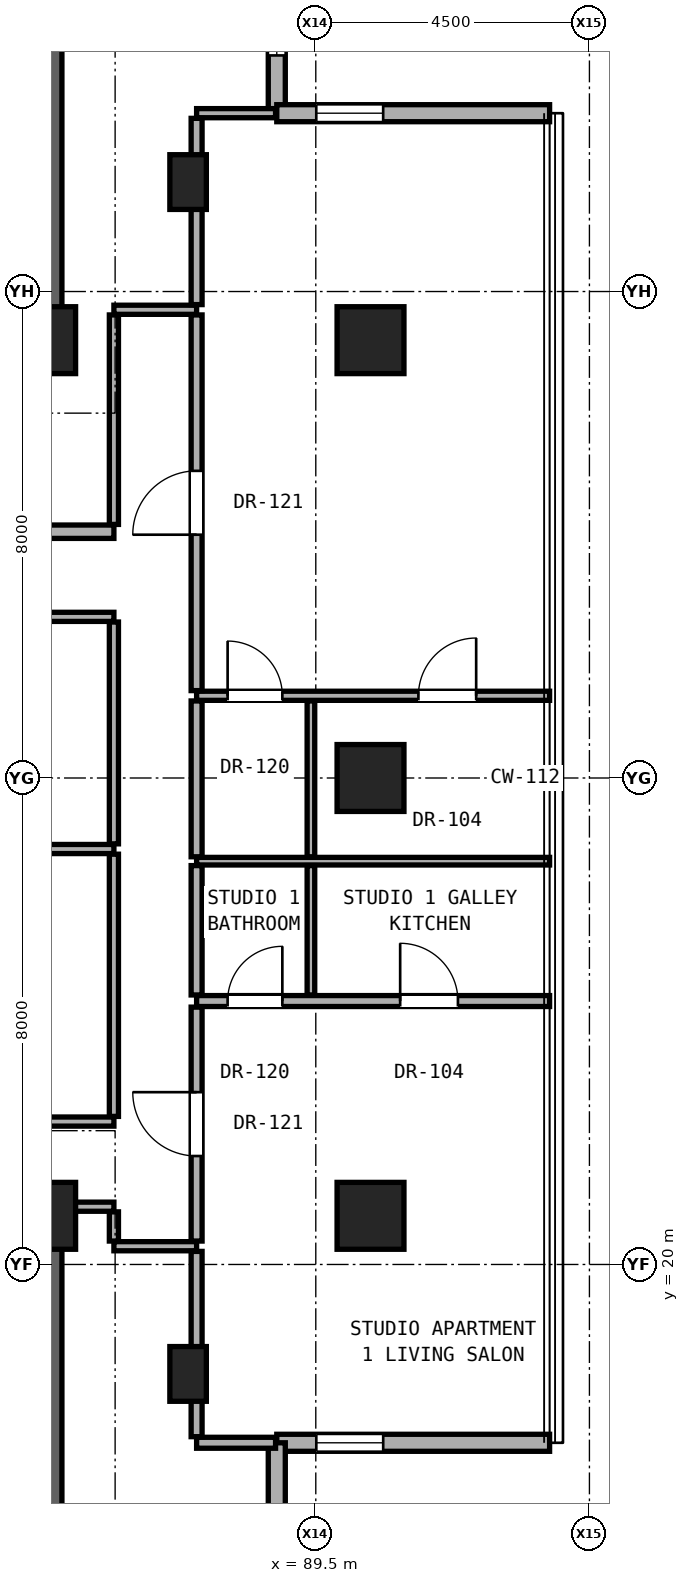
"""IFC4 building model, lengths in metres.
Left out: names, types, materials, properties, quantities, classifications, styles, units other than length and angle.
Written with IfcOpenShell. Run it as: python <this file> out.ifc"""

import sys

from ifc_helpers import new_model, si_unit, direction, frame, frame_2d, origin, origin_2d, place, context, subcontext, project, spatial, rectangle, hollow_rectangle, extrude, element, fill, save


model = new_model("IFC4")
c1 = context("Model", 3, precision=1e-05, world=origin(), true_north=direction((0.0, 1.0)))
c2 = subcontext(c1, "Body", "Model", "MODEL_VIEW")
j1 = project(units=[si_unit("LENGTHUNIT", "METRE"), si_unit("PLANEANGLEUNIT", "RADIAN")], contexts=[c1])
p1 = place(None, origin())
s1 = spatial("IfcSite", under=j1, at=p1, CompositionType="ELEMENT")
p2 = place(p1, origin())
s2 = spatial("IfcBuilding", under=s1, at=p2, CompositionType="ELEMENT")
p3 = place(p2, frame((0.0, 0.0, 118.1)))
s3 = spatial("IfcBuildingStorey", under=s2, at=p3, CompositionType="ELEMENT", Elevation=118.1)
for number, where, z_axis, x_axis in (
    (1, (85.0, 20.8, 0.0), (0.0, 0.0, 1.0), (1.0, 0.0, 0.0)),
    (2, (85.0, 35.2, 0.0), (0.0, 0.0, 1.0), (1.0, 0.0, 0.0)),
):
    element("IfcColumn", number, at=place(p3, frame(where, z_axis=z_axis, x_axis=x_axis)), inside=s3, PredefinedType="COLUMN", context=c2, shape_type="SweptSolid", body=[
        extrude(rectangle(XDim=1.1, YDim=1.1, at=origin_2d()), origin(), (0.0, 0.0, 1.0), 3.3),
    ])
for number, where, z_axis, x_axis in (
    (3, (90.4, 20.8, 0.0), (0.0, 0.0, 1.0), (1.0, 0.0, 0.0)),
    (4, (90.4, 28.0, 0.0), (0.0, 0.0, 1.0), (1.0, 0.0, 0.0)),
    (5, (90.4, 35.2, 0.0), (0.0, 0.0, 1.0), (1.0, 0.0, 0.0)),
):
    element("IfcColumn", number, at=place(p3, frame(where, z_axis=z_axis, x_axis=x_axis)), inside=s3, PredefinedType="COLUMN", context=c2, shape_type="SweptSolid", body=[
        extrude(hollow_rectangle(XDim=1.1, YDim=1.1, WallThickness=0.06, at=origin_2d()), origin(), (0.0, 0.0, 1.0), 3.3),
    ])
for number, where, z_axis, x_axis in (
    (6, (87.4, 18.2, 0.0), (0.0, 0.0, 1.0), (1.0, 0.0, 0.0)),
    (7, (87.4, 37.8, 0.0), (0.0, 0.0, 1.0), (1.0, 0.0, 0.0)),
):
    element("IfcColumn", number, at=place(p3, frame(where, z_axis=z_axis, x_axis=x_axis)), inside=s3, PredefinedType="PILASTER", context=c2, shape_type="SweptSolid", body=[
        extrude(rectangle(XDim=0.6, YDim=0.9, at=origin_2d()), origin(), (0.0, 0.0, 1.0), 3.3),
    ])
for number, where, z_axis, x_axis in (
    (8, (85.0, 35.2, 0.0), (0.0, 0.0, 1.0), (0.0, 1.0, 0.0)),
    (9, (85.0, 15.2, 0.0), (0.0, 0.0, 1.0), (0.0, 1.0, 0.0)),
):
    element("IfcWall", number, at=place(p3, frame(where, z_axis=z_axis, x_axis=x_axis)), inside=s3, PredefinedType="SHEAR", context=c2, shape_type="SweptSolid", body=[
        extrude(rectangle(XDim=5.6, YDim=0.65, at=frame_2d((2.8, 0.0))), origin(), (0.0, 0.0, 1.0), 3.08),
    ])
p4 = place(p3, frame((88.858, 38.933, 0.0), z_axis=(0.0, 0.0, 1.0), x_axis=(0.0, 1.0, 0.0)))
e10 = element("IfcWall", 10, at=p4, inside=s3, PredefinedType="SOLIDWALL", context=c2, shape_type="SweptSolid", body=[
    extrude(rectangle(XDim=4.486, YDim=0.28, at=frame_2d((2.243, 0.0))), origin(), (0.0, 0.0, 1.0), 3.06),
])
p5 = place(p4, frame((0.95, 0.0, 0.85)))
e11 = element("IfcOpeningElement", 11, at=p5, cuts=e10, PredefinedType="OPENING", context=c2, shape_type="SweptSolid", body=[
    extrude(rectangle(XDim=1.1, YDim=2.0, at=frame_2d((0.55, 1.0))), frame((0.0, 0.15, 0.0), z_axis=(0.0, -1.0, 0.0), x_axis=(1.0, 0.0, 0.0)), (0.0, 0.0, 1.0), 0.3),
])
p6 = place(p3, frame((88.858, 17.067, 0.0), z_axis=(0.0, 0.0, 1.0), x_axis=(1.0, 0.0, 0.0)))
e12 = element("IfcWall", 12, at=p6, inside=s3, PredefinedType="SOLIDWALL", context=c2, shape_type="SweptSolid", body=[
    extrude(rectangle(XDim=4.487, YDim=0.28, at=frame_2d((2.243, 0.0))), origin(), (0.0, 0.0, 1.0), 3.06),
])
p7 = place(p6, frame((0.65, 0.0, 0.85)))
e13 = element("IfcOpeningElement", 13, at=p7, cuts=e12, PredefinedType="OPENING", context=c2, shape_type="SweptSolid", body=[
    extrude(rectangle(XDim=1.1, YDim=2.0, at=frame_2d((0.55, 1.0))), frame((0.0, 0.15, 0.0), z_axis=(0.0, -1.0, 0.0), x_axis=(1.0, 0.0, 0.0)), (0.0, 0.0, 1.0), 0.3),
])
p8 = place(p3, frame((88.858, 12.581, 0.0), z_axis=(0.0, 0.0, 1.0), x_axis=(0.0, 1.0, 0.0)))
e14 = element("IfcWall", 14, at=p8, inside=s3, PredefinedType="SOLIDWALL", context=c2, shape_type="SweptSolid", body=[
    extrude(rectangle(XDim=4.486, YDim=0.28, at=frame_2d((2.243, 0.0))), origin(), (0.0, 0.0, 1.0), 3.06),
])
p9 = place(p3, frame((93.345, 38.933, 0.0), z_axis=(0.0, 0.0, 1.0), x_axis=(-1.0, 0.0, 0.0)))
e15 = element("IfcWall", 15, at=p9, inside=s3, PredefinedType="SOLIDWALL", context=c2, shape_type="SweptSolid", body=[
    extrude(rectangle(XDim=4.487, YDim=0.28, at=frame_2d((2.243, 0.0))), origin(), (0.0, 0.0, 1.0), 3.06),
])
p10 = place(p9, frame((2.737, 0.0, 0.85)))
e16 = element("IfcOpeningElement", 16, at=p10, cuts=e15, PredefinedType="OPENING", context=c2, shape_type="SweptSolid", body=[
    extrude(rectangle(XDim=1.1, YDim=2.0, at=frame_2d((0.55, 1.0))), frame((0.0, 0.15, 0.0), z_axis=(0.0, -1.0, 0.0), x_axis=(1.0, 0.0, 0.0)), (0.0, 0.0, 1.0), 0.3),
])
p11 = place(p3, frame((87.54, 17.068, 0.0), z_axis=(0.0, 0.0, 1.0), x_axis=(1.0, 0.0, 0.0)))
e17 = element("IfcWall", 17, at=p11, inside=s3, PredefinedType="PARTITIONING", context=c2, shape_type="SweptSolid", body=[
    extrude(rectangle(XDim=1.298, YDim=0.18, at=frame_2d((0.649, 0.0))), origin(), (0.0, 0.0, 1.0), 3.08),
])
p12 = place(p3, frame((86.18, 20.3, 0.0), z_axis=(0.0, 0.0, 1.0), x_axis=(1.0, 0.0, 0.0)))
e18 = element("IfcWall", 18, at=p12, inside=s3, PredefinedType="PARTITIONING", context=c2, shape_type="SweptSolid", body=[
    extrude(rectangle(XDim=1.36, YDim=0.15, at=frame_2d((0.68, 0.0))), origin(), (0.0, 0.0, 1.0), 3.08),
])
p13 = place(p3, frame((85.32, 20.95, 0.0), z_axis=(0.0, 0.0, 1.0), x_axis=(1.0, 0.0, 0.0)))
e19 = element("IfcWall", 19, at=p13, inside=s3, PredefinedType="PARTITIONING", context=c2, shape_type="SweptSolid", body=[
    extrude(rectangle(XDim=0.86, YDim=0.15, at=frame_2d((0.43, 0.0))), origin(), (0.0, 0.0, 1.0), 2.472),
])
p14 = place(p3, frame((66.68, 22.35, 0.0), z_axis=(0.0, 0.0, 1.0), x_axis=(1.0, 0.0, 0.0)))
e20 = element("IfcWall", 20, at=p14, inside=s3, PredefinedType="PARTITIONING", context=c2, shape_type="SweptSolid", body=[
    extrude(rectangle(XDim=19.5, YDim=0.15, at=frame_2d((9.75, 0.0))), origin(), (0.0, 0.0, 1.0), 2.216),
])
p15 = place(p14, frame((11.89, 0.0, 0.0)))
e21 = element("IfcOpeningElement", 21, at=p15, cuts=e20, PredefinedType="OPENING", context=c2, shape_type="SweptSolid", body=[
    extrude(rectangle(XDim=1.05, YDim=2.2, at=frame_2d((0.525, 1.1))), frame((0.0, 0.085, 0.0), z_axis=(0.0, -1.0, 0.0), x_axis=(1.0, 0.0, 0.0)), (0.0, 0.0, 1.0), 0.17),
])
p16 = place(p3, frame((87.54, 24.332, 0.0), z_axis=(0.0, 0.0, 1.0), x_axis=(1.0, 0.0, 0.0)))
e22 = element("IfcWall", 22, at=p16, inside=s3, PredefinedType="PARTITIONING", context=c2, shape_type="SweptSolid", body=[
    extrude(rectangle(XDim=5.805, YDim=0.18, at=frame_2d((2.902, 0.0))), origin(), (0.0, 0.0, 1.0), 2.299),
])
p17 = place(p16, frame((3.347, 0.0, 0.0)))
e23 = element("IfcOpeningElement", 23, at=p17, cuts=e22, PredefinedType="OPENING", context=c2, shape_type="SweptSolid", body=[
    extrude(rectangle(XDim=0.95, YDim=2.15, at=frame_2d((0.475, 1.075))), frame((0.0, 0.1, 0.0), z_axis=(0.0, -1.0, 0.0), x_axis=(1.0, 0.0, 0.0)), (0.0, 0.0, 1.0), 0.2),
])
p18 = place(p16, frame((0.51, 0.0, 0.0)))
e24 = element("IfcOpeningElement", 24, at=p18, cuts=e22, PredefinedType="OPENING", context=c2, shape_type="SweptSolid", body=[
    extrude(rectangle(XDim=0.9, YDim=2.1, at=frame_2d((0.45, 1.05))), frame((0.0, 0.1, 0.0), z_axis=(0.0, -1.0, 0.0), x_axis=(1.0, 0.0, 0.0)), (0.0, 0.0, 1.0), 0.2),
])
p19 = place(p3, frame((87.54, 26.632, 0.0), z_axis=(0.0, 0.0, 1.0), x_axis=(1.0, 0.0, 0.0)))
e25 = element("IfcWall", 25, at=p19, inside=s3, PredefinedType="PARTITIONING", context=c2, shape_type="SweptSolid", body=[
    extrude(rectangle(XDim=5.805, YDim=0.125, at=frame_2d((2.902, 0.0))), origin(), (0.0, 0.0, 1.0), 2.299),
])
p20 = place(p3, frame((72.05, 26.832, 0.0), z_axis=(0.0, 0.0, 1.0), x_axis=(1.0, 0.0, 0.0)))
e26 = element("IfcWall", 26, at=p20, inside=s3, PredefinedType="PARTITIONING", context=c2, shape_type="SweptSolid", body=[
    extrude(rectangle(XDim=14.13, YDim=0.15, at=frame_2d((7.065, 0.0))), origin(), (0.0, 0.0, 1.0), 2.216),
])
p21 = place(p3, frame((87.54, 29.352, 0.0), z_axis=(0.0, 0.0, 1.0), x_axis=(1.0, 0.0, 0.0)))
e27 = element("IfcWall", 27, at=p21, inside=s3, PredefinedType="PARTITIONING", context=c2, shape_type="SweptSolid", body=[
    extrude(rectangle(XDim=5.805, YDim=0.15, at=frame_2d((2.902, 0.0))), origin(), (0.0, 0.0, 1.0), 2.299),
])
p22 = place(p21, frame((3.647, 0.0, 0.0)))
e28 = element("IfcOpeningElement", 28, at=p22, cuts=e27, PredefinedType="OPENING", context=c2, shape_type="SweptSolid", body=[
    extrude(rectangle(XDim=0.95, YDim=2.15, at=frame_2d((0.475, 1.075))), frame((0.0, 0.085, 0.0), z_axis=(0.0, -1.0, 0.0), x_axis=(1.0, 0.0, 0.0)), (0.0, 0.0, 1.0), 0.17),
])
p23 = place(p21, frame((0.51, 0.0, 0.0)))
e29 = element("IfcOpeningElement", 29, at=p23, cuts=e27, PredefinedType="OPENING", context=c2, shape_type="SweptSolid", body=[
    extrude(rectangle(XDim=0.9, YDim=2.1, at=frame_2d((0.45, 1.05))), frame((0.0, 0.085, 0.0), z_axis=(0.0, -1.0, 0.0), x_axis=(1.0, 0.0, 0.0)), (0.0, 0.0, 1.0), 0.17),
])
p24 = place(p3, frame((66.68, 30.65, 0.0), z_axis=(0.0, 0.0, 1.0), x_axis=(1.0, 0.0, 0.0)))
e30 = element("IfcWall", 30, at=p24, inside=s3, PredefinedType="PARTITIONING", context=c2, shape_type="SweptSolid", body=[
    extrude(rectangle(XDim=19.5, YDim=0.15, at=frame_2d((9.75, 0.0))), origin(), (0.0, 0.0, 1.0), 2.216),
])
p25 = place(p24, frame((3.745, 0.0, 0.0)))
e31 = element("IfcOpeningElement", 31, at=p25, cuts=e30, PredefinedType="OPENING", context=c2, shape_type="SweptSolid", body=[
    extrude(rectangle(XDim=0.95, YDim=2.15, at=frame_2d((0.475, 1.075))), frame((0.0, 0.085, 0.0), z_axis=(0.0, -1.0, 0.0), x_axis=(1.0, 0.0, 0.0)), (0.0, 0.0, 1.0), 0.17),
])
p26 = place(p24, frame((11.89, 0.0, 0.0)))
e32 = element("IfcOpeningElement", 32, at=p26, cuts=e30, PredefinedType="OPENING", context=c2, shape_type="SweptSolid", body=[
    extrude(rectangle(XDim=1.05, YDim=2.2, at=frame_2d((0.525, 1.1))), frame((0.0, 0.085, 0.0), z_axis=(0.0, -1.0, 0.0), x_axis=(1.0, 0.0, 0.0)), (0.0, 0.0, 1.0), 0.17),
])
p27 = place(p3, frame((71.55, 32.05, 0.0), z_axis=(0.0, 0.0, 1.0), x_axis=(1.0, 0.0, 0.0)))
e33 = element("IfcWall", 33, at=p27, inside=s3, PredefinedType="SOLIDWALL", context=c2, shape_type="SweptSolid", body=[
    extrude(rectangle(XDim=14.63, YDim=0.22, at=frame_2d((7.315, 0.0))), origin(), (0.0, 0.0, 1.0), 2.216),
])
p28 = place(p27, frame((6.065, 0.0, 0.0)))
e34 = element("IfcOpeningElement", 34, at=p28, cuts=e33, PredefinedType="OPENING", context=c2, shape_type="SweptSolid", body=[
    extrude(rectangle(XDim=0.85, YDim=2.01, at=frame_2d((0.425, 1.005))), frame((0.0, 0.12, 0.0), z_axis=(0.0, -1.0, 0.0), x_axis=(1.0, 0.0, 0.0)), (0.0, 0.0, 1.0), 0.24),
])
p29 = place(p27, frame((10.535, 0.0, 0.0)))
e35 = element("IfcOpeningElement", 35, at=p29, cuts=e33, PredefinedType="OPENING", context=c2, shape_type="SweptSolid", body=[
    extrude(rectangle(XDim=0.95, YDim=2.15, at=frame_2d((0.475, 1.075))), frame((0.0, 0.12, 0.0), z_axis=(0.0, -1.0, 0.0), x_axis=(1.0, 0.0, 0.0)), (0.0, 0.0, 1.0), 0.24),
])
p30 = place(p27, frame((0.7, 0.0, 0.0)))
e36 = element("IfcOpeningElement", 36, at=p30, cuts=e33, PredefinedType="OPENING", context=c2, shape_type="SweptSolid", body=[
    extrude(rectangle(XDim=0.85, YDim=2.01, at=frame_2d((0.425, 1.005))), frame((0.0, 0.12, 0.0), z_axis=(0.0, -1.0, 0.0), x_axis=(1.0, 0.0, 0.0)), (0.0, 0.0, 1.0), 0.24),
])
p31 = place(p27, frame((2.55, 0.0, 0.0)))
e37 = element("IfcOpeningElement", 37, at=p31, cuts=e33, PredefinedType="OPENING", context=c2, shape_type="SweptSolid", body=[
    extrude(rectangle(XDim=0.85, YDim=2.01, at=frame_2d((0.425, 1.005))), frame((0.0, 0.12, 0.0), z_axis=(0.0, -1.0, 0.0), x_axis=(1.0, 0.0, 0.0)), (0.0, 0.0, 1.0), 0.24),
])
p32 = place(p3, frame((86.18, 35.7, 0.0), z_axis=(0.0, 0.0, 1.0), x_axis=(1.0, 0.0, 0.0)))
e38 = element("IfcWall", 38, at=p32, inside=s3, PredefinedType="PARTITIONING", context=c2, shape_type="SweptSolid", body=[
    extrude(rectangle(XDim=1.36, YDim=0.15, at=frame_2d((0.68, 0.0))), origin(), (0.0, 0.0, 1.0), 3.08),
])
p33 = place(p3, frame((87.54, 38.933, 0.0), z_axis=(0.0, 0.0, 1.0), x_axis=(1.0, 0.0, 0.0)))
e39 = element("IfcWall", 39, at=p33, inside=s3, PredefinedType="PARTITIONING", context=c2, shape_type="SweptSolid", body=[
    extrude(rectangle(XDim=1.298, YDim=0.15, at=frame_2d((0.649, 0.0))), origin(), (0.0, 0.0, 1.0), 3.08),
])
p34 = place(p3, frame((86.18, 20.385, 0.0), z_axis=(0.0, 0.0, 1.0), x_axis=(0.0, 1.0, 0.0)))
e40 = element("IfcWall", 40, at=p34, inside=s3, PredefinedType="PARTITIONING", context=c2, shape_type="SweptSolid", body=[
    extrude(rectangle(XDim=0.48, YDim=0.15, at=frame_2d((0.24, 0.0))), origin(), (0.0, 0.0, 1.0), 2.472),
])
p35 = place(p3, frame((86.18, 22.435, 0.0), z_axis=(0.0, 0.0, 1.0), x_axis=(0.0, 1.0, 0.0)))
e41 = element("IfcWall", 41, at=p35, inside=s3, PredefinedType="PARTITIONING", context=c2, shape_type="SweptSolid", body=[
    extrude(rectangle(XDim=4.312, YDim=0.15, at=frame_2d((2.156, 0.0))), origin(), (0.0, 0.0, 1.0), 3.08),
])
p36 = place(p3, frame((86.18, 26.917, 0.0), z_axis=(0.0, 0.0, 1.0), x_axis=(0.0, 1.0, 0.0)))
e42 = element("IfcWall", 42, at=p36, inside=s3, PredefinedType="PARTITIONING", context=c2, shape_type="SweptSolid", body=[
    extrude(rectangle(XDim=3.648, YDim=0.15, at=frame_2d((1.824, 0.0))), origin(), (0.0, 0.0, 1.0), 2.376),
])
p37 = place(p3, frame((86.18, 32.17, 0.0), z_axis=(0.0, 0.0, 1.0), x_axis=(0.0, 1.0, 0.0)))
e43 = element("IfcWall", 43, at=p37, inside=s3, PredefinedType="PARTITIONING", context=c2, shape_type="SweptSolid", body=[
    extrude(rectangle(XDim=3.445, YDim=0.15, at=frame_2d((1.723, 0.0))), origin(), (0.0, 0.0, 1.0), 2.472),
])
p38 = place(p3, frame((87.54, 17.168, 0.0), z_axis=(0.0, 0.0, 1.0), x_axis=(0.0, 1.0, 0.0)))
e44 = element("IfcWall", 44, at=p38, inside=s3, PredefinedType="PARTITIONING", context=c2, shape_type="SweptSolid", body=[
    extrude(rectangle(XDim=3.047, YDim=0.18, at=frame_2d((1.523, 0.0))), origin(), (0.0, 0.0, 1.0), 2.523),
])
p39 = place(p3, frame((87.54, 20.385, 0.0), z_axis=(0.0, 0.0, 1.0), x_axis=(0.0, 1.0, 0.0)))
e45 = element("IfcWall", 45, at=p39, inside=s3, PredefinedType="PARTITIONING", context=c2, shape_type="SweptSolid", body=[
    extrude(rectangle(XDim=3.847, YDim=0.18, at=frame_2d((1.923, 0.0))), origin(), (0.0, 0.0, 1.0), 2.472),
])
p40 = place(p39, frame((1.398, 0.0, 0.0)))
e46 = element("IfcOpeningElement", 46, at=p40, cuts=e45, PredefinedType="OPENING", context=c2, shape_type="SweptSolid", body=[
    extrude(rectangle(XDim=1.05, YDim=2.2, at=frame_2d((0.525, 1.1))), frame((0.0, 0.1, 0.0), z_axis=(0.0, -1.0, 0.0), x_axis=(1.0, 0.0, 0.0)), (0.0, 0.0, 1.0), 0.2),
])
p41 = place(p3, frame((87.54, 24.432, 0.0), z_axis=(0.0, 0.0, 1.0), x_axis=(0.0, 1.0, 0.0)))
e47 = element("IfcWall", 47, at=p41, inside=s3, PredefinedType="PARTITIONING", context=c2, shape_type="SweptSolid", body=[
    extrude(rectangle(XDim=2.128, YDim=0.18, at=frame_2d((1.064, 0.0))), origin(), (0.0, 0.0, 1.0), 3.08),
])
p42 = place(p3, frame((87.54, 26.705, 0.0), z_axis=(0.0, 0.0, 1.0), x_axis=(0.0, 1.0, 0.0)))
e48 = element("IfcWall", 48, at=p42, inside=s3, PredefinedType="PARTITIONING", context=c2, shape_type="SweptSolid", body=[
    extrude(rectangle(XDim=2.562, YDim=0.18, at=frame_2d((1.281, 0.0))), origin(), (0.0, 0.0, 1.0), 2.376),
])
p43 = place(p3, frame((87.54, 29.437, 0.0), z_axis=(0.0, 0.0, 1.0), x_axis=(0.0, 1.0, 0.0)))
e49 = element("IfcWall", 49, at=p43, inside=s3, PredefinedType="PARTITIONING", context=c2, shape_type="SweptSolid", body=[
    extrude(rectangle(XDim=6.178, YDim=0.18, at=frame_2d((3.089, 0.0))), origin(), (0.0, 0.0, 1.0), 2.472),
])
p44 = place(p43, frame((2.564, 0.0, 0.0)))
e50 = element("IfcOpeningElement", 50, at=p44, cuts=e49, PredefinedType="OPENING", context=c2, shape_type="SweptSolid", body=[
    extrude(rectangle(XDim=1.05, YDim=2.2, at=frame_2d((0.525, 1.1))), frame((0.0, 0.1, 0.0), z_axis=(0.0, -1.0, 0.0), x_axis=(1.0, 0.0, 0.0)), (0.0, 0.0, 1.0), 0.2),
])
p45 = place(p3, frame((87.54, 35.785, 0.0), z_axis=(0.0, 0.0, 1.0), x_axis=(0.0, 1.0, 0.0)))
e51 = element("IfcWall", 51, at=p45, inside=s3, PredefinedType="PARTITIONING", context=c2, shape_type="SweptSolid", body=[
    extrude(rectangle(XDim=3.063, YDim=0.18, at=frame_2d((1.531, 0.0))), origin(), (0.0, 0.0, 1.0), 2.523),
])
p46 = place(p3, frame((89.42, 24.432, 0.0), z_axis=(0.0, 0.0, 1.0), x_axis=(0.0, 1.0, 0.0)))
e52 = element("IfcWall", 52, at=p46, inside=s3, PredefinedType="PARTITIONING", context=c2, shape_type="SweptSolid", body=[
    extrude(rectangle(XDim=2.128, YDim=0.125, at=frame_2d((1.064, 0.0))), origin(), (0.0, 0.0, 1.0), 3.08),
])
p47 = place(p3, frame((89.42, 26.705, 0.0), z_axis=(0.0, 0.0, 1.0), x_axis=(0.0, 1.0, 0.0)))
e53 = element("IfcWall", 53, at=p47, inside=s3, PredefinedType="PARTITIONING", context=c2, shape_type="SweptSolid", body=[
    extrude(rectangle(XDim=2.562, YDim=0.125, at=frame_2d((1.281, 0.0))), origin(), (0.0, 0.0, 1.0), 2.376),
])
p48 = place(p5, origin())
e54 = element("IfcWindow", 54, at=p48, inside=s3, PartitioningType="SINGLE_PANEL", PredefinedType="WINDOW", context=c2, shape_type="SweptSolid", body=[
    extrude(rectangle(XDim=1.1, YDim=2.0, at=frame_2d((0.55, 1.0))), frame((0.0, 0.03, 0.0), z_axis=(0.0, -1.0, 0.0), x_axis=(1.0, 0.0, 0.0)), (0.0, 0.0, 1.0), 0.06),
])
fill(e11, e54)
p49 = place(p7, origin())
e55 = element("IfcWindow", 55, at=p49, inside=s3, PartitioningType="SINGLE_PANEL", PredefinedType="WINDOW", context=c2, shape_type="SweptSolid", body=[
    extrude(rectangle(XDim=1.1, YDim=2.0, at=frame_2d((0.55, 1.0))), frame((0.0, 0.03, 0.0), z_axis=(0.0, -1.0, 0.0), x_axis=(1.0, 0.0, 0.0)), (0.0, 0.0, 1.0), 0.06),
])
fill(e13, e55)
p50 = place(p10, origin())
e56 = element("IfcWindow", 56, at=p50, inside=s3, PartitioningType="SINGLE_PANEL", PredefinedType="WINDOW", context=c2, shape_type="SweptSolid", body=[
    extrude(rectangle(XDim=1.1, YDim=2.0, at=frame_2d((0.55, 1.0))), frame((0.0, 0.03, 0.0), z_axis=(0.0, -1.0, 0.0), x_axis=(1.0, 0.0, 0.0)), (0.0, 0.0, 1.0), 0.06),
])
fill(e16, e56)
p51 = place(p40, origin())
e57 = element("IfcDoor", 57, at=p51, inside=s3, OperationType="SINGLE_SWING_RIGHT", PredefinedType="DOOR", context=c2, shape_type="SweptSolid", body=[
    extrude(rectangle(XDim=1.05, YDim=2.2, at=frame_2d((0.525, 1.1))), frame((0.0, 0.025, 0.0), z_axis=(0.0, -1.0, 0.0), x_axis=(1.0, 0.0, 0.0)), (0.0, 0.0, 1.0), 0.05),
])
fill(e46, e57)
p52 = place(p17, origin())
e58 = element("IfcDoor", 58, at=p52, inside=s3, OperationType="SINGLE_SWING_LEFT", PredefinedType="DOOR", context=c2, shape_type="SweptSolid", body=[
    extrude(rectangle(XDim=0.95, YDim=2.15, at=frame_2d((0.475, 1.075))), frame((0.0, 0.025, 0.0), z_axis=(0.0, -1.0, 0.0), x_axis=(1.0, 0.0, 0.0)), (0.0, 0.0, 1.0), 0.05),
])
fill(e23, e58)
p53 = place(p18, origin())
e59 = element("IfcDoor", 59, at=p53, inside=s3, OperationType="SINGLE_SWING_RIGHT", PredefinedType="DOOR", context=c2, shape_type="SweptSolid", body=[
    extrude(rectangle(XDim=0.9, YDim=2.1, at=frame_2d((0.45, 1.05))), frame((0.0, 0.025, 0.0), z_axis=(0.0, -1.0, 0.0), x_axis=(1.0, 0.0, 0.0)), (0.0, 0.0, 1.0), 0.05),
])
fill(e24, e59)
p54 = place(p44, origin())
e60 = element("IfcDoor", 60, at=p54, inside=s3, OperationType="SINGLE_SWING_LEFT", PredefinedType="DOOR", context=c2, shape_type="SweptSolid", body=[
    extrude(rectangle(XDim=1.05, YDim=2.2, at=frame_2d((0.525, 1.1))), frame((0.0, 0.025, 0.0), z_axis=(0.0, -1.0, 0.0), x_axis=(1.0, 0.0, 0.0)), (0.0, 0.0, 1.0), 0.05),
])
fill(e50, e60)
p55 = place(p22, origin())
e61 = element("IfcDoor", 61, at=p55, inside=s3, OperationType="SINGLE_SWING_RIGHT", PredefinedType="DOOR", context=c2, shape_type="SweptSolid", body=[
    extrude(rectangle(XDim=0.95, YDim=2.15, at=frame_2d((0.475, 1.075))), frame((0.0, 0.025, 0.0), z_axis=(0.0, -1.0, 0.0), x_axis=(1.0, 0.0, 0.0)), (0.0, 0.0, 1.0), 0.05),
])
fill(e28, e61)
p56 = place(p23, origin())
e62 = element("IfcDoor", 62, at=p56, inside=s3, OperationType="SINGLE_SWING_LEFT", PredefinedType="DOOR", context=c2, shape_type="SweptSolid", body=[
    extrude(rectangle(XDim=0.9, YDim=2.1, at=frame_2d((0.45, 1.05))), frame((0.0, 0.025, 0.0), z_axis=(0.0, -1.0, 0.0), x_axis=(1.0, 0.0, 0.0)), (0.0, 0.0, 1.0), 0.05),
])
fill(e29, e62)
save(model, sys.argv[1])
